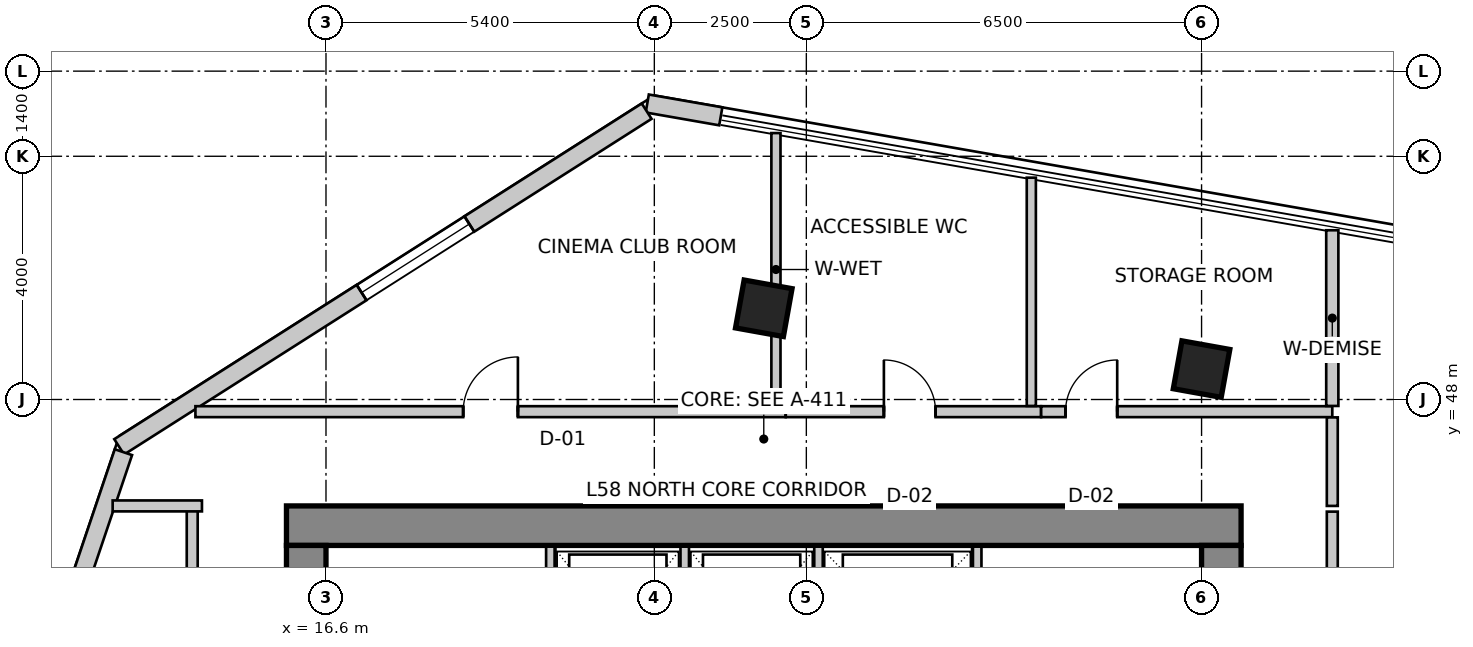
"""IFC4 building model, lengths in metres.
Left out: names, types, materials, properties, quantities, classifications, styles, units other than length and angle.
Written with IfcOpenShell. Run it as: python <this file> out.ifc"""

import sys

from ifc_helpers import new_model, si_unit, direction, frame, frame_2d, origin, origin_2d, place, context, subcontext, project, spatial, rectangle, extrude, source, transform, mapped, element, fill, save


model = new_model("IFC4")
c1 = context("Model", 3, precision=1e-05, world=origin(), true_north=direction((0.0, 1.0)))
c2 = subcontext(c1, "Body", "Model", "MODEL_VIEW")
j1 = project(units=[si_unit("LENGTHUNIT", "METRE"), si_unit("PLANEANGLEUNIT", "RADIAN")], contexts=[c1])
p1 = place(None, origin())
s1 = spatial("IfcSite", under=j1, at=p1, CompositionType="ELEMENT")
p2 = place(p1, origin())
s2 = spatial("IfcBuilding", under=s1, at=p2, CompositionType="ELEMENT")
p3 = place(p2, frame((0.0, 0.0, 228.9)))
s3 = spatial("IfcBuildingStorey", under=s2, at=p3, CompositionType="ELEMENT", Elevation=228.9)
p4 = place(p3, frame((15.95, 45.925, 0.0), z_axis=(0.0, 0.0, 1.0), x_axis=(1.0, 0.0, 0.0)))
e1 = element("IfcWall", 1, at=p4, inside=s3, PredefinedType="SHEAR", context=c2, shape_type="SweptSolid", body=[
    extrude(rectangle(XDim=15.7, YDim=0.65, at=frame_2d((7.85, 0.0))), origin(), (0.0, 0.0, 1.0), 3.5),
])
p5 = place(p3, frame((16.275, 34.2, 0.0), z_axis=(0.0, 0.0, 1.0), x_axis=(0.0, 1.0, 0.0)))
e2 = element("IfcWall", 2, at=p5, inside=s3, PredefinedType="SHEAR", context=c2, shape_type="SweptSolid", body=[
    extrude(rectangle(XDim=11.4, YDim=0.65, at=frame_2d((5.7, 0.0))), origin(), (0.0, 0.0, 1.0), 3.5),
])
m1 = source(origin(), c2, "Body", "SweptSolid", [
    extrude(rectangle(XDim=1.1, YDim=2.15, at=frame_2d((0.55, 1.075))), frame((0.0, 0.335, 0.0), z_axis=(0.0, -1.0, 0.0), x_axis=(1.0, 0.0, 0.0)), (0.0, 0.0, 1.0), 0.67),
])
p6 = place(p5, frame((7.15, 0.0, 0.0)))
e3 = element("IfcOpeningElement", 3, at=p6, cuts=e2, PredefinedType="OPENING", context=c2, shape_type="MappedRepresentation", body=[
    mapped(m1, transform((0.0, 0.0, 0.0), scale=1.0)),
])
p7 = place(p3, frame((31.325, 34.2, 0.0), z_axis=(0.0, 0.0, 1.0), x_axis=(0.0, 1.0, 0.0)))
e4 = element("IfcWall", 4, at=p7, inside=s3, PredefinedType="SHEAR", context=c2, shape_type="SweptSolid", body=[
    extrude(rectangle(XDim=11.4, YDim=0.65, at=frame_2d((5.7, 0.0))), origin(), (0.0, 0.0, 1.0), 3.5),
])
p8 = place(p7, frame((7.35, 0.0, 0.0)))
e5 = element("IfcOpeningElement", 5, at=p8, cuts=e4, PredefinedType="OPENING", context=c2, shape_type="MappedRepresentation", body=[
    mapped(m1, transform((0.0, 0.0, 0.0), scale=1.0)),
])
m2 = source(origin(), c2, "Body", "SweptSolid", [
    extrude(rectangle(XDim=0.8, YDim=0.8, at=origin_2d()), origin(), (0.0, 0.0, 1.0), 3.5),
])
for number, where, z_axis, x_axis in (
    (6, (23.8, 49.5, 0.0), (0.0, 0.0, 1.0), (0.984, -0.177, 0.0)),
    (7, (31.0, 48.5, 0.0), (0.0, 0.0, 1.0), (0.984, -0.177, 0.0)),
):
    element("IfcColumn", number, at=place(p3, frame(where, z_axis=z_axis, x_axis=x_axis)), inside=s3, PredefinedType="COLUMN", context=c2, shape_type="MappedRepresentation", body=[
        mapped(m2, transform((0.0, 0.0, 0.0), scale=1.0)),
    ])
p9 = place(p3, frame((23.093, 52.657, 0.0), z_axis=(0.0, 0.0, 1.0), x_axis=(-0.985090351288, 0.172037785961, 0.0)))
e8 = element("IfcWall", 8, at=p9, inside=s3, PredefinedType="SOLIDWALL", context=c2, shape_type="SweptSolid", body=[
    extrude(rectangle(XDim=1.228, YDim=0.3, at=frame_2d((0.614, 0.0))), origin(), (0.0, 0.0, 1.0), 3.25),
])
p10 = place(p3, frame((21.874, 52.742, 0.0), z_axis=(0.0, 0.0, 1.0), x_axis=(-0.84365659959, -0.536883173482, 0.0)))
e9 = element("IfcWall", 9, at=p10, inside=s3, PredefinedType="SOLIDWALL", context=c2, shape_type="SweptSolid", body=[
    extrude(rectangle(XDim=10.283, YDim=0.3, at=frame_2d((5.142, 0.0))), origin(), (0.0, 0.0, 1.0), 3.25),
])
m3 = source(origin(), c2, "Body", "SweptSolid", [
    extrude(rectangle(XDim=2.1, YDim=2.0, at=frame_2d((1.05, 1.0))), frame((0.0, 0.16, 0.0), z_axis=(0.0, -1.0, 0.0), x_axis=(1.0, 0.0, 0.0)), (0.0, 0.0, 1.0), 0.32),
])
p11 = place(p10, frame((3.457, 0.0, 0.85)))
e10 = element("IfcOpeningElement", 10, at=p11, cuts=e9, PredefinedType="OPENING", context=c2, shape_type="MappedRepresentation", body=[
    mapped(m3, transform((0.0, 0.0, 0.0), scale=1.0)),
])
p12 = place(p3, frame((13.269, 47.134, 0.0), z_axis=(0.0, 0.0, 1.0), x_axis=(-0.319920776449, -0.947444297464, 0.0)))
e11 = element("IfcWall", 11, at=p12, inside=s3, PredefinedType="SOLIDWALL", context=c2, shape_type="SweptSolid", body=[
    extrude(rectangle(XDim=16.133, YDim=0.3, at=frame_2d((8.067, 0.0))), origin(), (0.0, 0.0, 1.0), 3.25),
])
m4 = source(origin(), c2, "Body", "SweptSolid", [
    extrude(rectangle(XDim=2.4, YDim=2.2, at=frame_2d((1.2, 1.1))), frame((0.0, 0.16, 0.0), z_axis=(0.0, -1.0, 0.0), x_axis=(1.0, 0.0, 0.0)), (0.0, 0.0, 1.0), 0.32),
])
p13 = place(p12, frame((2.363, 0.0, 0.85)))
e12 = element("IfcOpeningElement", 12, at=p13, cuts=e11, PredefinedType="OPENING", context=c2, shape_type="MappedRepresentation", body=[
    mapped(m4, transform((0.0, 0.0, 0.0), scale=1.0)),
])
p14 = place(p12, frame((7.41, 0.0, 0.85)))
e13 = element("IfcOpeningElement", 13, at=p14, cuts=e11, PredefinedType="OPENING", context=c2, shape_type="MappedRepresentation", body=[
    mapped(m3, transform((0.0, 0.0, 0.0), scale=1.0)),
])
p15 = place(p12, frame((12.157, 0.0, 0.85)))
e14 = element("IfcOpeningElement", 14, at=p15, cuts=e11, PredefinedType="OPENING", context=c2, shape_type="MappedRepresentation", body=[
    mapped(m4, transform((0.0, 0.0, 0.0), scale=1.0)),
])
for number, where, z_axis, x_axis in (
    (15, (20.29, 43.28, 0.0), (0.0, 0.0, 1.0), (0.0, 1.0, 0.0)),
    (16, (27.31, 43.28, 0.0), (0.0, 0.0, 1.0), (0.0, 1.0, 0.0)),
):
    element("IfcWall", number, at=place(p3, frame(where, z_axis=z_axis, x_axis=x_axis)), inside=s3, PredefinedType="SOLIDWALL", context=c2, shape_type="SweptSolid", body=[
        extrude(rectangle(XDim=2.3, YDim=0.14, at=frame_2d((1.15, 0.0))), origin(), (0.0, 0.0, 1.0), 3.25),
    ])
for number, where, z_axis, x_axis in (
    (17, (22.5, 43.02, 0.0), (0.0, 0.0, 1.0), (0.0, 1.0, 0.0)),
    (18, (24.7, 43.02, 0.0), (0.0, 0.0, 1.0), (0.0, 1.0, 0.0)),
):
    element("IfcWall", number, at=place(p3, frame(where, z_axis=z_axis, x_axis=x_axis)), inside=s3, PredefinedType="SOLIDWALL", context=c2, shape_type="SweptSolid", body=[
        extrude(rectangle(XDim=2.56, YDim=0.14, at=frame_2d((1.28, 0.0))), origin(), (0.0, 0.0, 1.0), 3.25),
    ])
p16 = place(p3, frame((14.4, 33.644, 0.0), z_axis=(0.0, 0.0, 1.0), x_axis=(0.0, 1.0, 0.0)))
e19 = element("IfcWall", 19, at=p16, inside=s3, PredefinedType="PARTITIONING", context=c2, shape_type="SweptSolid", body=[
    extrude(rectangle(XDim=12.606, YDim=0.18, at=frame_2d((6.303, 0.0))), origin(), (0.0, 0.0, 1.0), 3.25),
])
m5 = source(origin(), c2, "Body", "SweptSolid", [
    extrude(rectangle(XDim=0.9, YDim=2.15, at=frame_2d((0.45, 1.075))), frame((0.0, 0.1, 0.0), z_axis=(0.0, -1.0, 0.0), x_axis=(1.0, 0.0, 0.0)), (0.0, 0.0, 1.0), 0.2),
])
p17 = place(p16, frame((4.399, 0.0, 0.0)))
e20 = element("IfcOpeningElement", 20, at=p17, cuts=e19, PredefinedType="OPENING", context=c2, shape_type="MappedRepresentation", body=[
    mapped(m5, transform((0.0, 0.0, 0.0), scale=1.0)),
])
p18 = place(p3, frame((14.56, 46.25, 0.0), z_axis=(0.0, 0.0, 1.0), x_axis=(-1.0, 0.0, 0.0)))
e21 = element("IfcWall", 21, at=p18, inside=s3, PredefinedType="PARTITIONING", context=c2, shape_type="SweptSolid", body=[
    extrude(rectangle(XDim=1.469, YDim=0.18, at=frame_2d((0.734, 0.0))), origin(), (0.0, 0.0, 1.0), 3.25),
])
p19 = place(p3, frame((14.453, 47.8, 0.0), z_axis=(0.0, 0.0, 1.0), x_axis=(1.0, 0.0, 0.0)))
e22 = element("IfcWall", 22, at=p19, inside=s3, PredefinedType="PARTITIONING", context=c2, shape_type="SweptSolid", body=[
    extrude(rectangle(XDim=9.707, YDim=0.18, at=frame_2d((4.854, 0.0))), origin(), (0.0, 0.0, 1.0), 2.919),
])
p20 = place(p19, frame((4.404, 0.0, 0.0)))
e23 = element("IfcOpeningElement", 23, at=p20, cuts=e22, PredefinedType="OPENING", context=c2, shape_type="MappedRepresentation", body=[
    mapped(m5, transform((0.0, 0.0, 0.0), scale=1.0)),
])
p21 = place(p3, frame((24.162, 47.8, 0.0), z_axis=(0.0, 0.0, 1.0), x_axis=(1.0, 0.0, 0.0)))
e24 = element("IfcWall", 24, at=p21, inside=s3, PredefinedType="PARTITIONING", context=c2, shape_type="SweptSolid", body=[
    extrude(rectangle(XDim=4.198, YDim=0.18, at=frame_2d((2.099, 0.0))), origin(), (0.0, 0.0, 1.0), 3.25),
])
m6 = source(origin(), c2, "Body", "SweptSolid", [
    extrude(rectangle(XDim=0.85, YDim=2.15, at=frame_2d((0.425, 1.075))), frame((0.0, 0.1, 0.0), z_axis=(0.0, -1.0, 0.0), x_axis=(1.0, 0.0, 0.0)), (0.0, 0.0, 1.0), 0.2),
])
p22 = place(p21, frame((1.613, 0.0, 0.0)))
e25 = element("IfcOpeningElement", 25, at=p22, cuts=e24, PredefinedType="OPENING", context=c2, shape_type="MappedRepresentation", body=[
    mapped(m6, transform((0.0, 0.0, 0.0), scale=1.0)),
])
p23 = place(p3, frame((28.362, 47.8, 0.0), z_axis=(0.0, 0.0, 1.0), x_axis=(1.0, 0.0, 0.0)))
e26 = element("IfcWall", 26, at=p23, inside=s3, PredefinedType="PARTITIONING", context=c2, shape_type="SweptSolid", body=[
    extrude(rectangle(XDim=4.788, YDim=0.18, at=frame_2d((2.394, 0.0))), origin(), (0.0, 0.0, 1.0), 2.779),
])
p24 = place(p23, frame((0.401, 0.0, 0.0)))
e27 = element("IfcOpeningElement", 27, at=p24, cuts=e26, PredefinedType="OPENING", context=c2, shape_type="MappedRepresentation", body=[
    mapped(m6, transform((0.0, 0.0, 0.0), scale=1.0)),
])
p25 = place(p3, frame((33.15, 47.706, 0.0), z_axis=(0.0, 0.0, 1.0), x_axis=(0.0, -1.0, 0.0)))
e28 = element("IfcWall", 28, at=p25, inside=s3, PredefinedType="PARTITIONING", context=c2, shape_type="SweptSolid", body=[
    extrude(rectangle(XDim=1.456, YDim=0.18, at=frame_2d((0.728, 0.0))), origin(), (0.0, 0.0, 1.0), 2.919),
])
p26 = place(p3, frame((33.15, 46.156, 0.0), z_axis=(0.0, 0.0, 1.0), x_axis=(0.0, -1.0, 0.0)))
e29 = element("IfcWall", 29, at=p26, inside=s3, PredefinedType="PARTITIONING", context=c2, shape_type="SweptSolid", body=[
    extrude(rectangle(XDim=4.733, YDim=0.18, at=frame_2d((2.366, 0.0))), origin(), (0.0, 0.0, 1.0), 2.779),
])
p27 = place(p26, frame((1.856, 0.0, 0.0)))
e30 = element("IfcOpeningElement", 30, at=p27, cuts=e29, PredefinedType="OPENING", context=c2, shape_type="MappedRepresentation", body=[
    mapped(m5, transform((0.0, 0.0, 0.0), scale=1.0)),
])
p28 = place(p3, frame((24.0, 52.382, 0.0), z_axis=(0.0, 0.0, 1.0), x_axis=(0.0, -1.0, 0.0)))
e31 = element("IfcWall", 31, at=p28, inside=s3, PredefinedType="PARTITIONING", context=c2, shape_type="SweptSolid", body=[
    extrude(rectangle(XDim=4.488, YDim=0.15, at=frame_2d((2.244, 0.0))), origin(), (0.0, 0.0, 1.0), 2.542),
])
p29 = place(p3, frame((28.2, 51.648, 0.0), z_axis=(0.0, 0.0, 1.0), x_axis=(0.0, -1.0, 0.0)))
e32 = element("IfcWall", 32, at=p29, inside=s3, PredefinedType="PARTITIONING", context=c2, shape_type="SweptSolid", body=[
    extrude(rectangle(XDim=3.754, YDim=0.15, at=frame_2d((1.877, 0.0))), origin(), (0.0, 0.0, 1.0), 2.542),
])
p30 = place(p3, frame((33.15, 50.783, 0.0), z_axis=(0.0, 0.0, 1.0), x_axis=(0.0, -1.0, 0.0)))
e33 = element("IfcWall", 33, at=p30, inside=s3, PredefinedType="PARTITIONING", context=c2, shape_type="SweptSolid", body=[
    extrude(rectangle(XDim=2.889, YDim=0.2, at=frame_2d((1.445, 0.0))), origin(), (0.0, 0.0, 1.0), 2.542),
])
m7 = source(origin(), c2, "Body", "SweptSolid", [
    extrude(rectangle(XDim=2.1, YDim=2.0, at=frame_2d((1.05, 1.0))), frame((0.0, -0.015, 0.0), z_axis=(0.0, -1.0, 0.0), x_axis=(1.0, 0.0, 0.0)), (0.0, 0.0, 1.0), 0.06),
])
p31 = place(p11, origin())
e34 = element("IfcWindow", 34, at=p31, inside=s3, PartitioningType="SINGLE_PANEL", PredefinedType="WINDOW", context=c2, shape_type="MappedRepresentation", body=[
    mapped(m7, transform((0.0, 0.0, 0.0), scale=1.0)),
])
fill(e10, e34)
m8 = source(origin(), c2, "Body", "SweptSolid", [
    extrude(rectangle(XDim=0.9, YDim=2.15, at=frame_2d((0.45, 1.075))), frame((0.0, 0.025, 0.0), z_axis=(0.0, -1.0, 0.0), x_axis=(1.0, 0.0, 0.0)), (0.0, 0.0, 1.0), 0.05),
])
p32 = place(p20, origin())
e35 = element("IfcDoor", 35, at=p32, inside=s3, OperationType="SINGLE_SWING_RIGHT", PredefinedType="DOOR", context=c2, shape_type="MappedRepresentation", body=[
    mapped(m8, transform((0.0, 0.0, 0.0), scale=1.0)),
])
fill(e23, e35)
m9 = source(origin(), c2, "Body", "SweptSolid", [
    extrude(rectangle(XDim=0.85, YDim=2.15, at=frame_2d((0.425, 1.075))), frame((0.0, 0.025, 0.0), z_axis=(0.0, -1.0, 0.0), x_axis=(1.0, 0.0, 0.0)), (0.0, 0.0, 1.0), 0.05),
])
p33 = place(p22, origin())
e36 = element("IfcDoor", 36, at=p33, inside=s3, OperationType="SINGLE_SWING_LEFT", PredefinedType="DOOR", context=c2, shape_type="MappedRepresentation", body=[
    mapped(m9, transform((0.0, 0.0, 0.0), scale=1.0)),
])
fill(e25, e36)
p34 = place(p24, origin())
e37 = element("IfcDoor", 37, at=p34, inside=s3, OperationType="SINGLE_SWING_RIGHT", PredefinedType="DOOR", context=c2, shape_type="MappedRepresentation", body=[
    mapped(m9, transform((0.0, 0.0, 0.0), scale=1.0)),
])
fill(e27, e37)
save(model, sys.argv[1])
